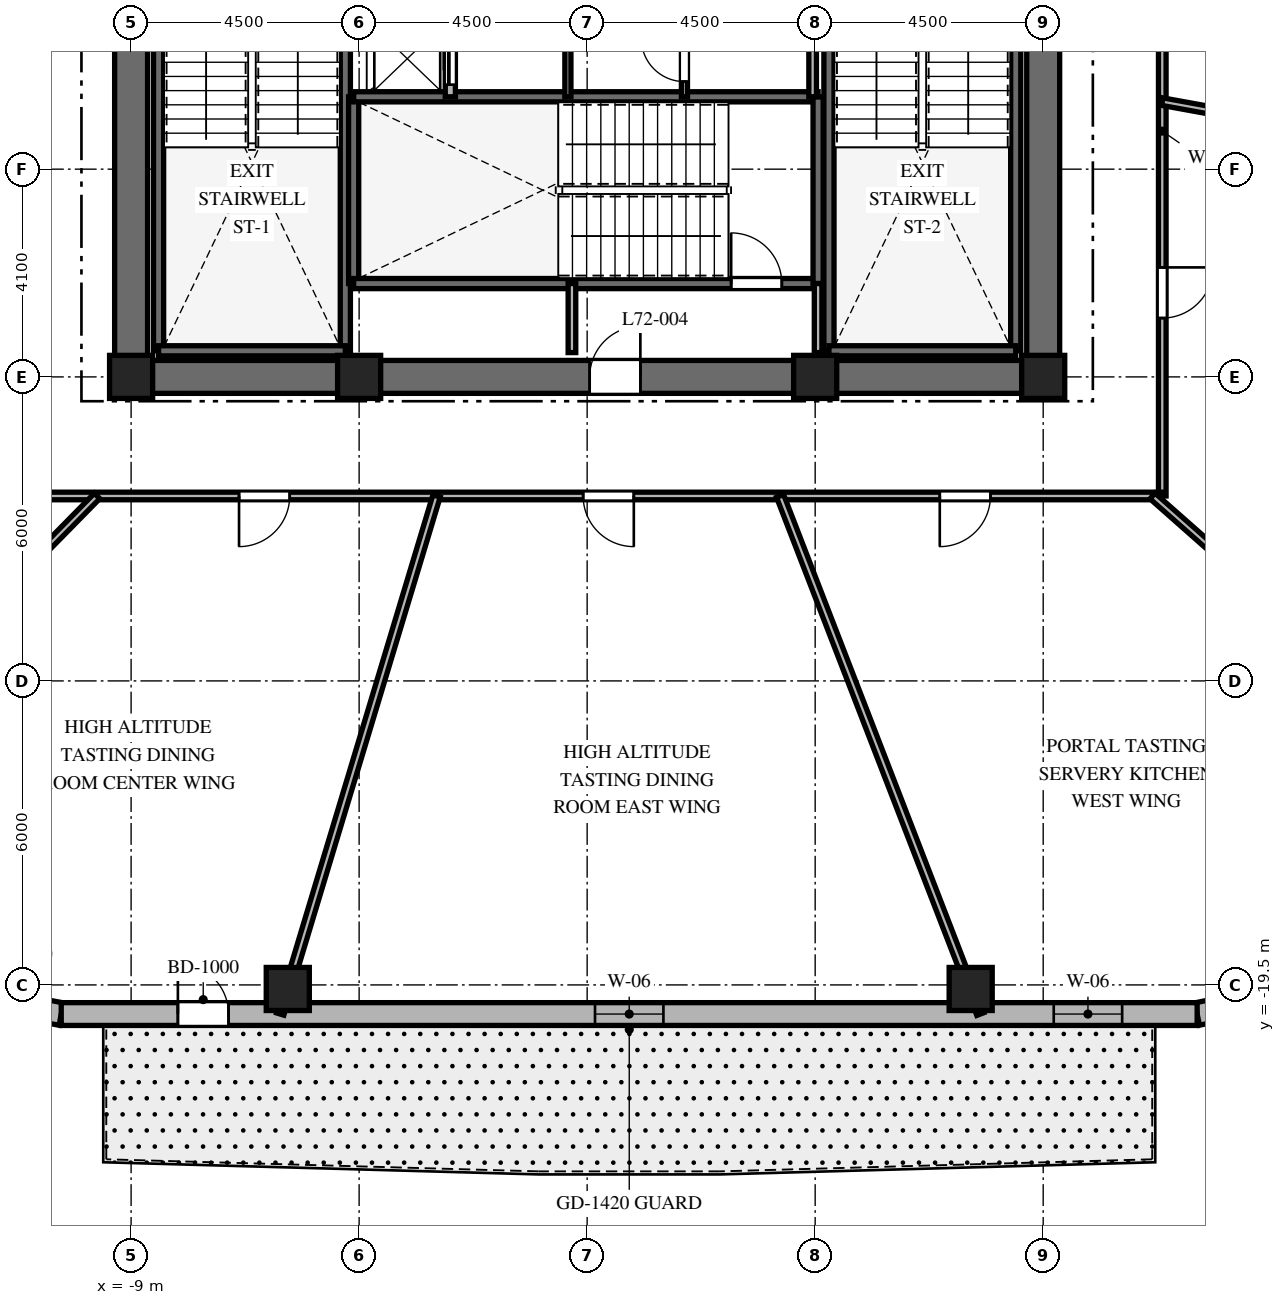
"""IFC4 building model, lengths in metres.
Left out: names, types, materials, properties, quantities, classifications, styles, units other than length and angle.
Written with IfcOpenShell. Run it as: python <this file> out.ifc"""

import sys

from ifc_helpers import new_model, si_unit, direction, frame, frame_2d, origin, origin_2d, place, context, subcontext, project, spatial, rectangle, extrude, element, fill, save


model = new_model("IFC4")
c1 = context("Model", 3, precision=1e-05, world=origin(), true_north=direction((0.0, 1.0)))
c2 = subcontext(c1, "Body", "Model", "MODEL_VIEW")
j1 = project(units=[si_unit("LENGTHUNIT", "METRE"), si_unit("PLANEANGLEUNIT", "RADIAN")], contexts=[c1])
p1 = place(None, origin())
s1 = spatial("IfcSite", under=j1, at=p1, CompositionType="ELEMENT")
p2 = place(p1, origin())
s2 = spatial("IfcBuilding", under=s1, at=p2, CompositionType="ELEMENT")
p3 = place(p2, frame((0.0, 0.0, 288.6)))
s3 = spatial("IfcBuildingStorey", under=s2, at=p3, CompositionType="ELEMENT", Elevation=288.6)
p4 = place(p3, frame((-9.325, -7.5, 0.0), z_axis=(0.0, 0.0, 1.0), x_axis=(1.0, 0.0, 0.0)))
e1 = element("IfcWall", 1, at=p4, inside=s3, PredefinedType="SHEAR", context=c2, shape_type="SweptSolid", body=[
    extrude(rectangle(XDim=18.65, YDim=0.65, at=frame_2d((9.325, 0.0))), origin(), (0.0, 0.0, 1.0), 4.5),
])
p5 = place(p4, frame((9.375, 0.0, 0.0)))
e2 = element("IfcOpeningElement", 2, at=p5, cuts=e1, PredefinedType="OPENING", context=c2, shape_type="SweptSolid", body=[
    extrude(rectangle(XDim=1.0, YDim=2.15, at=frame_2d((0.5, 1.075))), frame((0.0, 0.335, 0.0), z_axis=(0.0, -1.0, 0.0), x_axis=(1.0, 0.0, 0.0)), (0.0, 0.0, 1.0), 0.67),
])
p6 = place(p3, frame((-9.0, -7.175, 0.0), z_axis=(0.0, 0.0, 1.0), x_axis=(0.0, 1.0, 0.0)))
e3 = element("IfcWall", 3, at=p6, inside=s3, PredefinedType="SHEAR", context=c2, shape_type="SweptSolid", body=[
    extrude(rectangle(XDim=14.35, YDim=0.65, at=frame_2d((7.175, 0.0))), origin(), (0.0, 0.0, 1.0), 4.5),
])
p7 = place(p6, frame((10.3, 0.0, 0.0)))
e4 = element("IfcOpeningElement", 4, at=p7, cuts=e3, PredefinedType="OPENING", context=c2, shape_type="SweptSolid", body=[
    extrude(rectangle(XDim=1.05, YDim=2.15, at=frame_2d((0.525, 1.075))), frame((0.0, 0.335, 0.0), z_axis=(0.0, -1.0, 0.0), x_axis=(1.0, 0.0, 0.0)), (0.0, 0.0, 1.0), 0.67),
])
p8 = place(p3, frame((9.0, -7.175, 0.0), z_axis=(0.0, 0.0, 1.0), x_axis=(0.0, 1.0, 0.0)))
e5 = element("IfcWall", 5, at=p8, inside=s3, PredefinedType="SHEAR", context=c2, shape_type="SweptSolid", body=[
    extrude(rectangle(XDim=14.35, YDim=0.65, at=frame_2d((7.175, 0.0))), origin(), (0.0, 0.0, 1.0), 4.5),
])
p9 = place(p8, frame((10.3, 0.0, 0.0)))
e6 = element("IfcOpeningElement", 6, at=p9, cuts=e5, PredefinedType="OPENING", context=c2, shape_type="SweptSolid", body=[
    extrude(rectangle(XDim=1.05, YDim=2.15, at=frame_2d((0.525, 1.075))), frame((0.0, 0.335, 0.0), z_axis=(0.0, -1.0, 0.0), x_axis=(1.0, 0.0, 0.0)), (0.0, 0.0, 1.0), 0.67),
])
for number, where, z_axis, x_axis in (
    (7, (-8.458, -6.985, 0.0), (0.0, 0.0, 1.0), (0.0, 1.0, 0.0)),
    (8, (-4.772, -6.985, 0.0), (0.0, 0.0, 1.0), (0.0, 1.0, 0.0)),
):
    element("IfcWall", number, at=place(p3, frame(where, z_axis=z_axis, x_axis=x_axis)), inside=s3, PredefinedType="SHEAR", context=c2, shape_type="SweptSolid", body=[
        extrude(rectangle(XDim=9.143, YDim=0.2, at=frame_2d((4.572, 0.0))), origin(), (0.0, 0.0, 1.0), 4.5),
    ])
p10 = place(p3, frame((-8.458, -6.985, 0.0), z_axis=(0.0, 0.0, 1.0), x_axis=(1.0, 0.0, 0.0)))
e9 = element("IfcWall", 9, at=p10, inside=s3, PredefinedType="SHEAR", context=c2, shape_type="SweptSolid", body=[
    extrude(rectangle(XDim=3.686, YDim=0.2, at=frame_2d((1.843, 0.0))), origin(), (0.0, 0.0, 1.0), 4.5),
])
for number, where, z_axis, x_axis in (
    (10, (4.772, -6.985, 0.0), (0.0, 0.0, 1.0), (0.0, 1.0, 0.0)),
    (11, (8.458, -6.985, 0.0), (0.0, 0.0, 1.0), (0.0, 1.0, 0.0)),
):
    element("IfcWall", number, at=place(p3, frame(where, z_axis=z_axis, x_axis=x_axis)), inside=s3, PredefinedType="SHEAR", context=c2, shape_type="SweptSolid", body=[
        extrude(rectangle(XDim=9.143, YDim=0.2, at=frame_2d((4.572, 0.0))), origin(), (0.0, 0.0, 1.0), 4.5),
    ])
for number, where, z_axis, x_axis in (
    (12, (4.772, -6.985, 0.0), (0.0, 0.0, 1.0), (1.0, 0.0, 0.0)),
    (13, (-4.608, -5.658, 0.0), (0.0, 0.0, 1.0), (0.0, 1.0, 0.0)),
):
    element("IfcWall", number, at=place(p3, frame(where, z_axis=z_axis, x_axis=x_axis)), inside=s3, PredefinedType="SHEAR", context=c2, shape_type="SweptSolid", body=[
        extrude(rectangle(XDim=3.686, YDim=0.2, at=frame_2d((1.843, 0.0))), origin(), (0.0, 0.0, 1.0), 4.5),
    ])
p11 = place(p3, frame((-4.608, -5.658, 0.0), z_axis=(0.0, 0.0, 1.0), x_axis=(1.0, 0.0, 0.0)))
e14 = element("IfcWall", 14, at=p11, inside=s3, PredefinedType="SHEAR", context=c2, shape_type="SweptSolid", body=[
    extrude(rectangle(XDim=9.166, YDim=0.2, at=frame_2d((4.583, 0.0))), origin(), (0.0, 0.0, 1.0), 4.5),
])
p12 = place(p11, frame((7.45, 0.0, 0.0)))
e15 = element("IfcOpeningElement", 15, at=p12, cuts=e14, PredefinedType="OPENING", context=c2, shape_type="SweptSolid", body=[
    extrude(rectangle(XDim=1.0, YDim=2.15, at=frame_2d((0.5, 1.075))), frame((0.0, 0.11, 0.0), z_axis=(0.0, -1.0, 0.0), x_axis=(1.0, 0.0, 0.0)), (0.0, 0.0, 1.0), 0.22),
])
p13 = place(p3, frame((-4.608, -1.972, 0.0), z_axis=(0.0, 0.0, 1.0), x_axis=(1.0, 0.0, 0.0)))
e16 = element("IfcWall", 16, at=p13, inside=s3, PredefinedType="SHEAR", context=c2, shape_type="SweptSolid", body=[
    extrude(rectangle(XDim=9.166, YDim=0.2, at=frame_2d((4.583, 0.0))), origin(), (0.0, 0.0, 1.0), 4.5),
])
p14 = place(p3, frame((4.558, -5.658, 0.0), z_axis=(0.0, 0.0, 1.0), x_axis=(0.0, 1.0, 0.0)))
e17 = element("IfcWall", 17, at=p14, inside=s3, PredefinedType="SHEAR", context=c2, shape_type="SweptSolid", body=[
    extrude(rectangle(XDim=3.686, YDim=0.2, at=frame_2d((1.843, 0.0))), origin(), (0.0, 0.0, 1.0), 4.5),
])
for number, where, z_axis, x_axis in (
    (18, (-9.0, -7.5, 0.0), (0.0, 0.0, 1.0), (1.0, 0.0, 0.0)),
    (19, (-4.5, -7.5, 0.0), (0.0, 0.0, 1.0), (1.0, 0.0, 0.0)),
    (20, (4.5, -7.5, 0.0), (0.0, 0.0, 1.0), (1.0, 0.0, 0.0)),
    (21, (9.0, -7.5, 0.0), (0.0, 0.0, 1.0), (1.0, 0.0, 0.0)),
    (22, (-5.908, -19.58, 0.0), (0.0, 0.0, 1.0), (1.0, 0.0, 0.0)),
    (23, (7.569, -19.58, 0.0), (0.0, 0.0, 1.0), (1.0, 0.0, 0.0)),
):
    element("IfcColumn", number, at=place(p3, frame(where, z_axis=z_axis, x_axis=x_axis)), inside=s3, PredefinedType="COLUMN", context=c2, shape_type="SweptSolid", body=[
        extrude(rectangle(XDim=0.85, YDim=0.85, at=origin_2d()), origin(), (0.0, 0.0, 1.0), 4.5),
    ])
p15 = place(p3, frame((-11.626, -19.84, 0.0), z_axis=(0.0, 0.0, 1.0), x_axis=(0.982701956681, -0.185194126083, 0.0)))
e24 = element("IfcWall", 24, at=p15, inside=s3, PredefinedType="SOLIDWALL", context=c2, shape_type="SweptSolid", body=[
    extrude(rectangle(XDim=1.27, YDim=0.45, at=frame_2d((0.635, 0.0))), origin(), (0.0, 0.0, 1.0), 4.18),
])
p16 = place(p3, frame((12.038, -20.075, 0.0), z_axis=(0.0, 0.0, 1.0), x_axis=(0.978750122553, 0.205056571711, 0.0)))
e25 = element("IfcWall", 25, at=p16, inside=s3, PredefinedType="SOLIDWALL", context=c2, shape_type="SweptSolid", body=[
    extrude(rectangle(XDim=1.406, YDim=0.45, at=frame_2d((0.703, 0.0))), origin(), (0.0, 0.0, 1.0), 4.18),
])
p17 = place(p3, frame((-10.379, -20.075, 0.0), z_axis=(0.0, 0.0, 1.0), x_axis=(1.0, 0.0, 0.0)))
e26 = element("IfcWall", 26, at=p17, inside=s3, PredefinedType="SOLIDWALL", context=c2, shape_type="SweptSolid", body=[
    extrude(rectangle(XDim=22.417, YDim=0.45, at=frame_2d((11.208, 0.0))), origin(), (0.0, 0.0, 1.0), 4.18),
])
p18 = place(p17, frame((2.302, 0.0, 0.0)))
e27 = element("IfcOpeningElement", 27, at=p18, cuts=e26, PredefinedType="OPENING", context=c2, shape_type="SweptSolid", body=[
    extrude(rectangle(XDim=1.0, YDim=2.15, at=frame_2d((0.5, 1.075))), frame((0.0, 0.235, 0.0), z_axis=(0.0, -1.0, 0.0), x_axis=(1.0, 0.0, 0.0)), (0.0, 0.0, 1.0), 0.47),
])
p19 = place(p17, frame((10.534, 0.0, 0.8)))
e28 = element("IfcOpeningElement", 28, at=p19, cuts=e26, PredefinedType="OPENING", context=c2, shape_type="SweptSolid", body=[
    extrude(rectangle(XDim=1.35, YDim=1.75, at=frame_2d((0.675, 0.875))), frame((0.0, 0.235, 0.0), z_axis=(0.0, -1.0, 0.0), x_axis=(1.0, 0.0, 0.0)), (0.0, 0.0, 1.0), 0.47),
])
p20 = place(p17, frame((19.587, 0.0, 0.8)))
e29 = element("IfcOpeningElement", 29, at=p20, cuts=e26, PredefinedType="OPENING", context=c2, shape_type="SweptSolid", body=[
    extrude(rectangle(XDim=1.35, YDim=1.75, at=frame_2d((0.675, 0.875))), frame((0.0, 0.235, 0.0), z_axis=(0.0, -1.0, 0.0), x_axis=(1.0, 0.0, 0.0)), (0.0, 0.0, 1.0), 0.47),
])
for number, where, z_axis, x_axis in (
    (30, (-0.3, -7.02, 0.0), (0.0, 0.0, 1.0), (0.0, 1.0, 0.0)),
    (31, (4.558, -7.02, 0.0), (0.0, 0.0, 1.0), (0.0, 1.0, 0.0)),
):
    element("IfcWall", number, at=place(p3, frame(where, z_axis=z_axis, x_axis=x_axis)), inside=s3, PredefinedType="PARTITIONING", context=c2, shape_type="SweptSolid", body=[
        extrude(rectangle(XDim=1.362, YDim=0.15, at=frame_2d((0.681, 0.0))), origin(), (0.0, 0.0, 1.0), 4.18),
    ])
p21 = place(p3, frame((-2.7, -1.972, 0.0), z_axis=(0.0, 0.0, 1.0), x_axis=(0.0, 1.0, 0.0)))
e32 = element("IfcWall", 32, at=p21, inside=s3, PredefinedType="PARTITIONING", context=c2, shape_type="SweptSolid", body=[
    extrude(rectangle(XDim=1.472, YDim=0.2, at=frame_2d((0.736, 0.0))), origin(), (0.0, 0.0, 1.0), 4.18),
])
p22 = place(p21, frame((0.24, 0.0, 0.0)))
e33 = element("IfcOpeningElement", 33, at=p22, cuts=e32, PredefinedType="OPENING", context=c2, shape_type="SweptSolid", body=[
    extrude(rectangle(XDim=1.0, YDim=2.2, at=frame_2d((0.5, 1.1))), frame((0.0, 0.11, 0.0), z_axis=(0.0, -1.0, 0.0), x_axis=(1.0, 0.0, 0.0)), (0.0, 0.0, 1.0), 0.22),
])
p23 = place(p3, frame((4.45, -1.972, 0.0), z_axis=(0.0, 0.0, 1.0), x_axis=(0.0, 1.0, 0.0)))
e34 = element("IfcWall", 34, at=p23, inside=s3, PredefinedType="PARTITIONING", context=c2, shape_type="SweptSolid", body=[
    extrude(rectangle(XDim=4.222, YDim=0.15, at=frame_2d((2.111, 0.0))), origin(), (0.0, 0.0, 1.0), 4.18),
])
p24 = place(p3, frame((-0.38, -1.972, 0.0), z_axis=(0.0, 0.0, 1.0), x_axis=(0.0, 1.0, 0.0)))
e35 = element("IfcWall", 35, at=p24, inside=s3, PredefinedType="PARTITIONING", context=c2, shape_type="SweptSolid", body=[
    extrude(rectangle(XDim=1.472, YDim=0.12, at=frame_2d((0.736, 0.0))), origin(), (0.0, 0.0, 1.0), 4.18),
])
p25 = place(p3, frame((1.92, -1.972, 0.0), z_axis=(0.0, 0.0, 1.0), x_axis=(0.0, 1.0, 0.0)))
e36 = element("IfcWall", 36, at=p25, inside=s3, PredefinedType="PARTITIONING", context=c2, shape_type="SweptSolid", body=[
    extrude(rectangle(XDim=1.472, YDim=0.12, at=frame_2d((0.736, 0.0))), origin(), (0.0, 0.0, 1.0), 4.18),
])
p26 = place(p25, frame((0.3, 0.0, 0.0)))
e37 = element("IfcOpeningElement", 37, at=p26, cuts=e36, PredefinedType="OPENING", context=c2, shape_type="SweptSolid", body=[
    extrude(rectangle(XDim=0.85, YDim=2.03, at=frame_2d((0.425, 1.015))), frame((0.0, 0.07, 0.0), z_axis=(0.0, -1.0, 0.0), x_axis=(1.0, 0.0, 0.0)), (0.0, 0.0, 1.0), 0.14),
])
p27 = place(p3, frame((11.35, 9.85, 0.0), z_axis=(0.0, 0.0, 1.0), x_axis=(0.0, -1.0, 0.0)))
e38 = element("IfcWall", 38, at=p27, inside=s3, PredefinedType="PARTITIONING", context=c2, shape_type="SweptSolid", body=[
    extrude(rectangle(XDim=19.7, YDim=0.15, at=frame_2d((9.85, 0.0))), origin(), (0.0, 0.0, 1.0), 3.67),
])
p28 = place(p27, frame((2.973, 0.0, 0.0)))
e39 = element("IfcOpeningElement", 39, at=p28, cuts=e38, PredefinedType="OPENING", context=c2, shape_type="SweptSolid", body=[
    extrude(rectangle(XDim=1.0, YDim=2.03, at=frame_2d((0.5, 1.015))), frame((0.0, 0.085, 0.0), z_axis=(0.0, -1.0, 0.0), x_axis=(1.0, 0.0, 0.0)), (0.0, 0.0, 1.0), 0.17),
])
p29 = place(p27, frame((15.189, 0.0, 0.0)))
e40 = element("IfcOpeningElement", 40, at=p29, cuts=e38, PredefinedType="OPENING", context=c2, shape_type="SweptSolid", body=[
    extrude(rectangle(XDim=1.0, YDim=2.03, at=frame_2d((0.5, 1.015))), frame((0.0, 0.085, 0.0), z_axis=(0.0, -1.0, 0.0), x_axis=(1.0, 0.0, 0.0)), (0.0, 0.0, 1.0), 0.17),
])
p30 = place(p27, frame((8.81, 0.0, 0.0)))
e41 = element("IfcOpeningElement", 41, at=p30, cuts=e38, PredefinedType="OPENING", context=c2, shape_type="SweptSolid", body=[
    extrude(rectangle(XDim=1.0, YDim=2.03, at=frame_2d((0.5, 1.015))), frame((0.0, 0.085, 0.0), z_axis=(0.0, -1.0, 0.0), x_axis=(1.0, 0.0, 0.0)), (0.0, 0.0, 1.0), 0.17),
])
p31 = place(p3, frame((11.35, -9.85, 0.0), z_axis=(0.0, 0.0, 1.0), x_axis=(-1.0, 0.0, 0.0)))
e42 = element("IfcWall", 42, at=p31, inside=s3, PredefinedType="PARTITIONING", context=c2, shape_type="SweptSolid", body=[
    extrude(rectangle(XDim=22.7, YDim=0.15, at=frame_2d((11.35, 0.0))), origin(), (0.0, 0.0, 1.0), 3.67),
])
p32 = place(p31, frame((17.22, 0.0, 0.0)))
e43 = element("IfcOpeningElement", 43, at=p32, cuts=e42, PredefinedType="OPENING", context=c2, shape_type="SweptSolid", body=[
    extrude(rectangle(XDim=1.0, YDim=2.03, at=frame_2d((0.5, 1.015))), frame((0.0, 0.085, 0.0), z_axis=(0.0, -1.0, 0.0), x_axis=(1.0, 0.0, 0.0)), (0.0, 0.0, 1.0), 0.17),
])
p33 = place(p31, frame((10.429, 0.0, 0.0)))
e44 = element("IfcOpeningElement", 44, at=p33, cuts=e42, PredefinedType="OPENING", context=c2, shape_type="SweptSolid", body=[
    extrude(rectangle(XDim=1.0, YDim=2.03, at=frame_2d((0.5, 1.015))), frame((0.0, 0.085, 0.0), z_axis=(0.0, -1.0, 0.0), x_axis=(1.0, 0.0, 0.0)), (0.0, 0.0, 1.0), 0.17),
])
p34 = place(p31, frame((3.391, 0.0, 0.0)))
e45 = element("IfcOpeningElement", 45, at=p34, cuts=e42, PredefinedType="OPENING", context=c2, shape_type="SweptSolid", body=[
    extrude(rectangle(XDim=1.0, YDim=2.03, at=frame_2d((0.5, 1.015))), frame((0.0, 0.085, 0.0), z_axis=(0.0, -1.0, 0.0), x_axis=(1.0, 0.0, 0.0)), (0.0, 0.0, 1.0), 0.17),
])
p35 = place(p3, frame((-9.672, -9.85, 0.0), z_axis=(0.0, 0.0, 1.0), x_axis=(-0.700629771301, -0.713524998558, 0.0)))
e46 = element("IfcWall", 46, at=p35, inside=s3, PredefinedType="PARTITIONING", context=c2, shape_type="SweptSolid", body=[
    extrude(rectangle(XDim=7.459, YDim=0.15, at=frame_2d((3.73, 0.0))), origin(), (0.0, 0.0, 1.0), 3.52),
])
p36 = place(p3, frame((-2.972, -9.85, 0.0), z_axis=(0.0, 0.0, 1.0), x_axis=(-0.288872169679, -0.957367677324, 0.0)))
e47 = element("IfcWall", 47, at=p36, inside=s3, PredefinedType="PARTITIONING", context=c2, shape_type="SweptSolid", body=[
    extrude(rectangle(XDim=10.68, YDim=0.15, at=frame_2d((5.34, 0.0))), origin(), (0.0, 0.0, 1.0), 3.52),
])
p37 = place(p3, frame((3.808, -9.85, 0.0), z_axis=(0.0, 0.0, 1.0), x_axis=(0.360587327934, -0.932725457427, 0.0)))
e48 = element("IfcWall", 48, at=p37, inside=s3, PredefinedType="PARTITIONING", context=c2, shape_type="SweptSolid", body=[
    extrude(rectangle(XDim=10.962, YDim=0.15, at=frame_2d((5.481, 0.0))), origin(), (0.0, 0.0, 1.0), 3.52),
])
p38 = place(p3, frame((11.157, -9.85, 0.0), z_axis=(0.0, 0.0, 1.0), x_axis=(0.74966962095, -0.661812253909, 0.0)))
e49 = element("IfcWall", 49, at=p38, inside=s3, PredefinedType="PARTITIONING", context=c2, shape_type="SweptSolid", body=[
    extrude(rectangle(XDim=6.989, YDim=0.15, at=frame_2d((3.494, 0.0))), origin(), (0.0, 0.0, 1.0), 3.52),
])
p39 = place(p3, frame((11.35, -2.067, 0.0), z_axis=(0.0, 0.0, 1.0), x_axis=(0.983816386236, -0.179179569634, 0.0)))
e50 = element("IfcWall", 50, at=p39, inside=s3, PredefinedType="PARTITIONING", context=c2, shape_type="SweptSolid", body=[
    extrude(rectangle(XDim=8.911, YDim=0.15, at=frame_2d((4.456, 0.0))), origin(), (0.0, 0.0, 1.0), 3.52),
])
p40 = place(p18, origin())
e51 = element("IfcDoor", 51, at=p40, inside=s3, OperationType="SINGLE_SWING_LEFT", PredefinedType="DOOR", context=c2, shape_type="SweptSolid", body=[
    extrude(rectangle(XDim=1.0, YDim=2.15, at=frame_2d((0.5, 1.075))), frame((0.0, 0.025, 0.0), z_axis=(0.0, -1.0, 0.0), x_axis=(1.0, 0.0, 0.0)), (0.0, 0.0, 1.0), 0.05),
])
fill(e27, e51)
p41 = place(p19, origin())
e52 = element("IfcWindow", 52, at=p41, inside=s3, PartitioningType="SINGLE_PANEL", PredefinedType="WINDOW", context=c2, shape_type="SweptSolid", body=[
    extrude(rectangle(XDim=1.35, YDim=1.75, at=frame_2d((0.675, 0.875))), frame((0.0, 0.03, 0.0), z_axis=(0.0, -1.0, 0.0), x_axis=(1.0, 0.0, 0.0)), (0.0, 0.0, 1.0), 0.06),
])
fill(e28, e52)
p42 = place(p20, origin())
e53 = element("IfcWindow", 53, at=p42, inside=s3, PartitioningType="SINGLE_PANEL", PredefinedType="WINDOW", context=c2, shape_type="SweptSolid", body=[
    extrude(rectangle(XDim=1.35, YDim=1.75, at=frame_2d((0.675, 0.875))), frame((0.0, 0.03, 0.0), z_axis=(0.0, -1.0, 0.0), x_axis=(1.0, 0.0, 0.0)), (0.0, 0.0, 1.0), 0.06),
])
fill(e29, e53)
p43 = place(p12, origin())
e54 = element("IfcDoor", 54, at=p43, inside=s3, OperationType="SINGLE_SWING_LEFT", PredefinedType="DOOR", context=c2, shape_type="SweptSolid", body=[
    extrude(rectangle(XDim=1.0, YDim=2.15, at=frame_2d((0.5, 1.075))), frame((0.0, 0.025, 0.0), z_axis=(0.0, -1.0, 0.0), x_axis=(1.0, 0.0, 0.0)), (0.0, 0.0, 1.0), 0.05),
])
fill(e15, e54)
p44 = place(p5, origin())
e55 = element("IfcDoor", 55, at=p44, inside=s3, OperationType="SINGLE_SWING_RIGHT", PredefinedType="DOOR", context=c2, shape_type="SweptSolid", body=[
    extrude(rectangle(XDim=1.0, YDim=2.15, at=frame_2d((0.5, 1.075))), frame((0.0, 0.025, 0.0), z_axis=(0.0, -1.0, 0.0), x_axis=(1.0, 0.0, 0.0)), (0.0, 0.0, 1.0), 0.05),
])
fill(e2, e55)
p45 = place(p22, origin())
e56 = element("IfcDoor", 56, at=p45, inside=s3, OperationType="SLIDING_TO_LEFT", PredefinedType="DOOR", context=c2, shape_type="SweptSolid", body=[
    extrude(rectangle(XDim=1.0, YDim=2.2, at=frame_2d((0.5, 1.1))), frame((0.0, 0.025, 0.0), z_axis=(0.0, -1.0, 0.0), x_axis=(1.0, 0.0, 0.0)), (0.0, 0.0, 1.0), 0.05),
])
fill(e33, e56)
p46 = place(p26, origin())
e57 = element("IfcDoor", 57, at=p46, inside=s3, OperationType="SINGLE_SWING_RIGHT", PredefinedType="DOOR", context=c2, shape_type="SweptSolid", body=[
    extrude(rectangle(XDim=0.85, YDim=2.03, at=frame_2d((0.425, 1.015))), frame((0.0, 0.025, 0.0), z_axis=(0.0, -1.0, 0.0), x_axis=(1.0, 0.0, 0.0)), (0.0, 0.0, 1.0), 0.05),
])
fill(e37, e57)
p47 = place(p32, origin())
e58 = element("IfcDoor", 58, at=p47, inside=s3, OperationType="SINGLE_SWING_RIGHT", PredefinedType="DOOR", context=c2, shape_type="SweptSolid", body=[
    extrude(rectangle(XDim=1.0, YDim=2.03, at=frame_2d((0.5, 1.015))), frame((0.0, 0.025, 0.0), z_axis=(0.0, -1.0, 0.0), x_axis=(1.0, 0.0, 0.0)), (0.0, 0.0, 1.0), 0.05),
])
fill(e43, e58)
p48 = place(p33, origin())
e59 = element("IfcDoor", 59, at=p48, inside=s3, OperationType="SINGLE_SWING_LEFT", PredefinedType="DOOR", context=c2, shape_type="SweptSolid", body=[
    extrude(rectangle(XDim=1.0, YDim=2.03, at=frame_2d((0.5, 1.015))), frame((0.0, 0.025, 0.0), z_axis=(0.0, -1.0, 0.0), x_axis=(1.0, 0.0, 0.0)), (0.0, 0.0, 1.0), 0.05),
])
fill(e44, e59)
p49 = place(p34, origin())
e60 = element("IfcDoor", 60, at=p49, inside=s3, OperationType="SINGLE_SWING_RIGHT", PredefinedType="DOOR", context=c2, shape_type="SweptSolid", body=[
    extrude(rectangle(XDim=1.0, YDim=2.03, at=frame_2d((0.5, 1.015))), frame((0.0, 0.025, 0.0), z_axis=(0.0, -1.0, 0.0), x_axis=(1.0, 0.0, 0.0)), (0.0, 0.0, 1.0), 0.05),
])
fill(e45, e60)
p50 = place(p29, origin())
e61 = element("IfcDoor", 61, at=p50, inside=s3, OperationType="SINGLE_SWING_LEFT", PredefinedType="DOOR", context=c2, shape_type="SweptSolid", body=[
    extrude(rectangle(XDim=1.0, YDim=2.03, at=frame_2d((0.5, 1.015))), frame((0.0, 0.025, 0.0), z_axis=(0.0, -1.0, 0.0), x_axis=(1.0, 0.0, 0.0)), (0.0, 0.0, 1.0), 0.05),
])
fill(e40, e61)
save(model, sys.argv[1])
